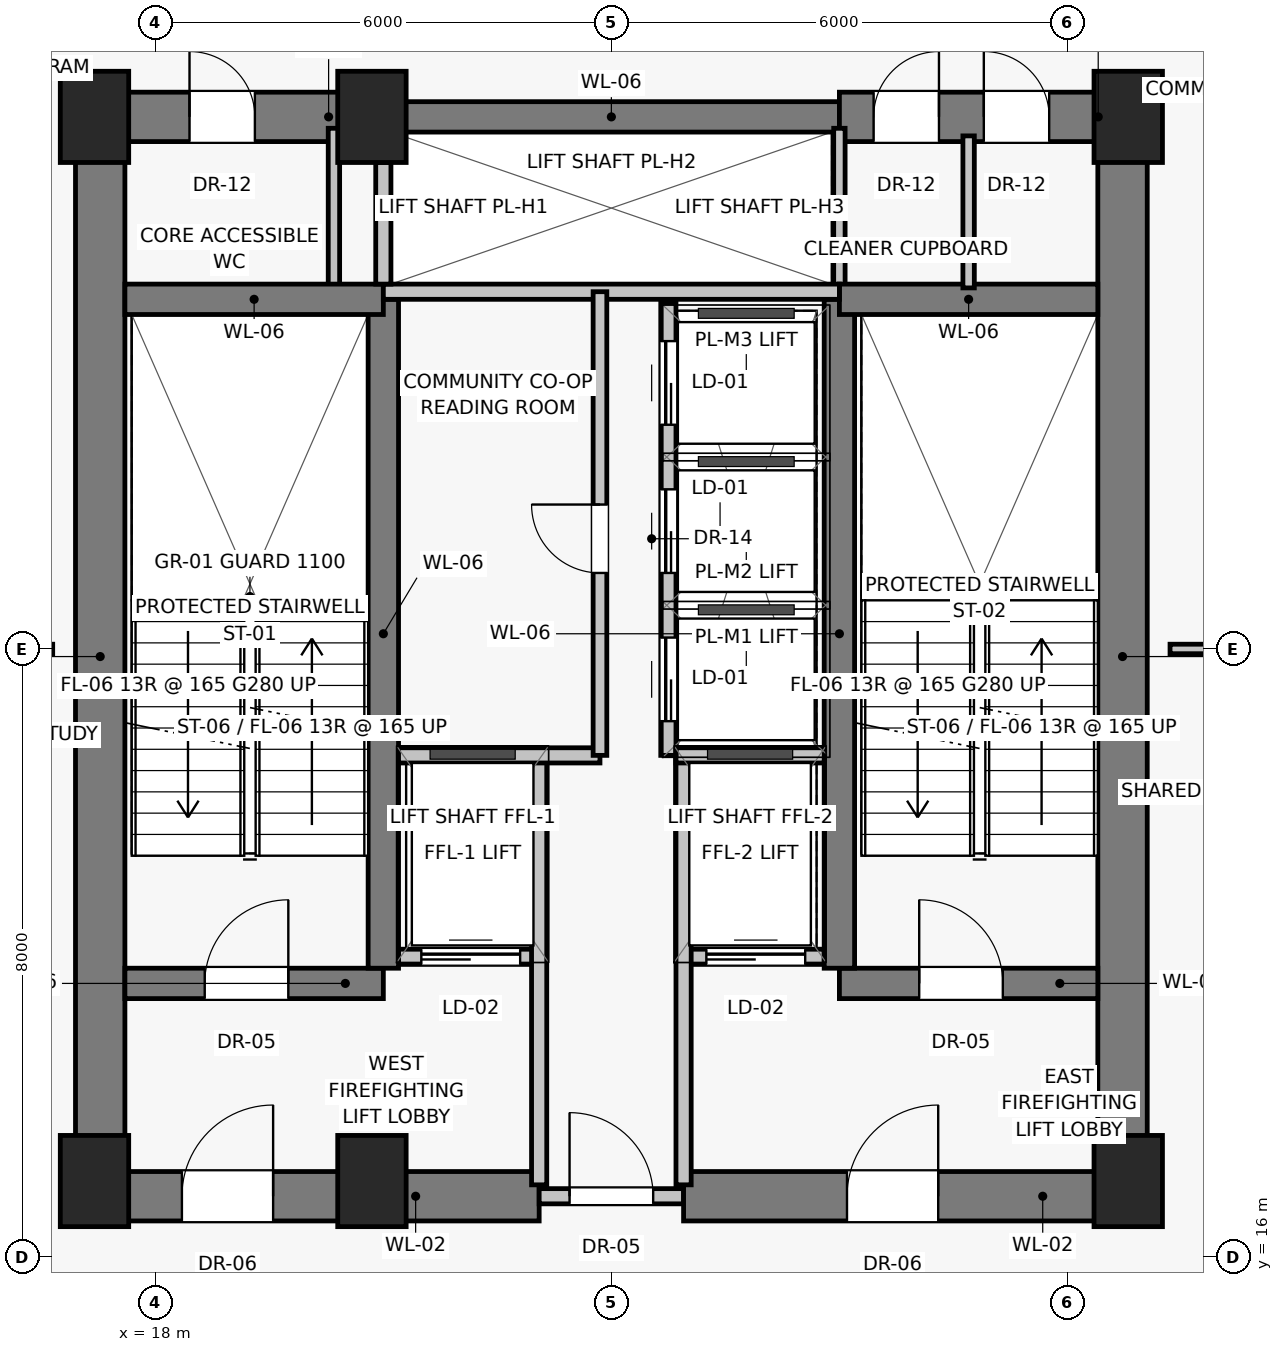
"""IFC4 building model, lengths in metres.
Left out: names, types, materials, properties, quantities, classifications, styles, units other than length and angle.
Written with IfcOpenShell. Run it as: python <this file> out.ifc"""

import sys

from ifc_helpers import new_model, si_unit, direction, frame, frame_2d, origin, origin_2d, place, context, subcontext, project, spatial, rectangle, extrude, source, transform, mapped, element, fill, save


model = new_model("IFC4")
c1 = context("Model", 3, precision=1e-05, world=origin(), true_north=direction((0.0, 1.0)))
c2 = subcontext(c1, "Body", "Model", "MODEL_VIEW")
j1 = project(units=[si_unit("LENGTHUNIT", "METRE"), si_unit("PLANEANGLEUNIT", "RADIAN")], contexts=[c1])
p1 = place(None, origin())
s1 = spatial("IfcSite", under=j1, at=p1, CompositionType="ELEMENT")
p2 = place(p1, origin())
s2 = spatial("IfcBuilding", under=s1, at=p2, CompositionType="ELEMENT")
p3 = place(p2, frame((0.0, 0.0, 108.95)))
s3 = spatial("IfcBuildingStorey", under=s2, at=p3, CompositionType="ELEMENT", Elevation=108.95)
for number, where, z_axis, x_axis in (
    (1, (17.2, 17.0, 0.0), (0.0, 0.0, 1.0), (1.0, 0.0, 0.0)),
    (2, (20.85, 17.0, 0.0), (0.0, 0.0, 1.0), (1.0, 0.0, 0.0)),
    (3, (30.8, 17.0, 0.0), (0.0, 0.0, 1.0), (1.0, 0.0, 0.0)),
    (4, (17.2, 31.0, 0.0), (0.0, 0.0, 1.0), (1.0, 0.0, 0.0)),
    (5, (20.85, 31.0, 0.0), (0.0, 0.0, 1.0), (1.0, 0.0, 0.0)),
    (6, (30.8, 31.0, 0.0), (0.0, 0.0, 1.0), (1.0, 0.0, 0.0)),
):
    element("IfcColumn", number, at=place(p3, frame(where, z_axis=z_axis, x_axis=x_axis)), inside=s3, PredefinedType="PILASTER", context=c2, shape_type="SweptSolid", body=[
        extrude(rectangle(XDim=0.9, YDim=1.2, at=origin_2d()), origin(), (0.0, 0.0, 1.0), 4.3),
    ])
for number, where, z_axis, x_axis in (
    (7, (17.275, 16.8, 0.0), (0.0, 0.0, 1.0), (0.0, 1.0, 0.0)),
    (8, (30.725, 16.8, 0.0), (0.0, 0.0, 1.0), (0.0, 1.0, 0.0)),
):
    element("IfcWall", number, at=place(p3, frame(where, z_axis=z_axis, x_axis=x_axis)), inside=s3, PredefinedType="SHEAR", context=c2, shape_type="SweptSolid", body=[
        extrude(rectangle(XDim=14.2, YDim=0.65, at=frame_2d((7.1, 0.0))), origin(), (0.0, 0.0, 1.0), 4.05),
    ])
p4 = place(p3, frame((17.2, 16.8, 0.0), z_axis=(0.0, 0.0, 1.0), x_axis=(1.0, 0.0, 0.0)))
e9 = element("IfcWall", 9, at=p4, inside=s3, PredefinedType="SHEAR", context=c2, shape_type="SweptSolid", body=[
    extrude(rectangle(XDim=5.85, YDim=0.65, at=frame_2d((2.925, 0.0))), origin(), (0.0, 0.0, 1.0), 4.05),
])
p5 = place(p4, frame((1.15, 0.0, 0.0)))
e10 = element("IfcOpeningElement", 10, at=p5, cuts=e9, PredefinedType="OPENING", context=c2, shape_type="SweptSolid", body=[
    extrude(rectangle(XDim=1.2, YDim=2.03, at=frame_2d((0.6, 1.015))), frame((0.0, 0.335, 0.0), z_axis=(0.0, -1.0, 0.0), x_axis=(1.0, 0.0, 0.0)), (0.0, 0.0, 1.0), 0.67),
])
p6 = place(p3, frame((23.05, 16.8, 0.0), z_axis=(0.0, 0.0, 1.0), x_axis=(1.0, 0.0, 0.0)))
e11 = element("IfcWall", 11, at=p6, inside=s3, PredefinedType="SOLIDWALL", context=c2, shape_type="SweptSolid", body=[
    extrude(rectangle(XDim=1.9, YDim=0.2, at=frame_2d((0.95, 0.0))), origin(), (0.0, 0.0, 1.0), 3.2),
])
p7 = place(p6, frame((0.4, 0.0, 0.0)))
e12 = element("IfcOpeningElement", 12, at=p7, cuts=e11, PredefinedType="OPENING", context=c2, shape_type="SweptSolid", body=[
    extrude(rectangle(XDim=1.1, YDim=2.03, at=frame_2d((0.55, 1.015))), frame((0.0, 0.11, 0.0), z_axis=(0.0, -1.0, 0.0), x_axis=(1.0, 0.0, 0.0)), (0.0, 0.0, 1.0), 0.22),
])
p8 = place(p3, frame((24.95, 16.8, 0.0), z_axis=(0.0, 0.0, 1.0), x_axis=(1.0, 0.0, 0.0)))
e13 = element("IfcWall", 13, at=p8, inside=s3, PredefinedType="SHEAR", context=c2, shape_type="SweptSolid", body=[
    extrude(rectangle(XDim=5.85, YDim=0.65, at=frame_2d((2.925, 0.0))), origin(), (0.0, 0.0, 1.0), 4.05),
])
p9 = place(p8, frame((2.15, 0.0, 0.0)))
e14 = element("IfcOpeningElement", 14, at=p9, cuts=e13, PredefinedType="OPENING", context=c2, shape_type="SweptSolid", body=[
    extrude(rectangle(XDim=1.2, YDim=2.03, at=frame_2d((0.6, 1.015))), frame((0.0, 0.335, 0.0), z_axis=(0.0, -1.0, 0.0), x_axis=(1.0, 0.0, 0.0)), (0.0, 0.0, 1.0), 0.67),
])
p10 = place(p3, frame((17.2, 31.0, 0.0), z_axis=(0.0, 0.0, 1.0), x_axis=(1.0, 0.0, 0.0)))
e15 = element("IfcWall", 15, at=p10, inside=s3, PredefinedType="SHEAR", context=c2, shape_type="SweptSolid", body=[
    extrude(rectangle(XDim=3.8, YDim=0.65, at=frame_2d((1.9, 0.0))), origin(), (0.0, 0.0, 1.0), 4.05),
])
p11 = place(p10, frame((1.25, 0.0, 0.0)))
e16 = element("IfcOpeningElement", 16, at=p11, cuts=e15, PredefinedType="OPENING", context=c2, shape_type="SweptSolid", body=[
    extrude(rectangle(XDim=0.86, YDim=2.01, at=frame_2d((0.43, 1.005))), frame((0.0, 0.335, 0.0), z_axis=(0.0, -1.0, 0.0), x_axis=(1.0, 0.0, 0.0)), (0.0, 0.0, 1.0), 0.67),
])
p12 = place(p3, frame((21.0, 31.0, 0.0), z_axis=(0.0, 0.0, 1.0), x_axis=(1.0, 0.0, 0.0)))
e17 = element("IfcWall", 17, at=p12, inside=s3, PredefinedType="SHEAR", context=c2, shape_type="SweptSolid", body=[
    extrude(rectangle(XDim=6.0, YDim=0.4, at=frame_2d((3.0, 0.0))), origin(), (0.0, 0.0, 1.0), 4.05),
])
p13 = place(p3, frame((27.0, 31.0, 0.0), z_axis=(0.0, 0.0, 1.0), x_axis=(1.0, 0.0, 0.0)))
e18 = element("IfcWall", 18, at=p13, inside=s3, PredefinedType="SHEAR", context=c2, shape_type="SweptSolid", body=[
    extrude(rectangle(XDim=3.8, YDim=0.65, at=frame_2d((1.9, 0.0))), origin(), (0.0, 0.0, 1.0), 4.05),
])
p14 = place(p13, frame((0.45, 0.0, 0.0)))
e19 = element("IfcOpeningElement", 19, at=p14, cuts=e18, PredefinedType="OPENING", context=c2, shape_type="SweptSolid", body=[
    extrude(rectangle(XDim=0.86, YDim=2.01, at=frame_2d((0.43, 1.005))), frame((0.0, 0.335, 0.0), z_axis=(0.0, -1.0, 0.0), x_axis=(1.0, 0.0, 0.0)), (0.0, 0.0, 1.0), 0.67),
])
p15 = place(p13, frame((1.9, 0.0, 0.0)))
e20 = element("IfcOpeningElement", 20, at=p15, cuts=e18, PredefinedType="OPENING", context=c2, shape_type="SweptSolid", body=[
    extrude(rectangle(XDim=0.86, YDim=2.01, at=frame_2d((0.43, 1.005))), frame((0.0, 0.335, 0.0), z_axis=(0.0, -1.0, 0.0), x_axis=(1.0, 0.0, 0.0)), (0.0, 0.0, 1.0), 0.67),
])
for number, where, z_axis, x_axis in (
    (21, (20.35, 28.65, 0.0), (0.0, 0.0, 1.0), (0.0, 1.0, 0.0)),
    (22, (27.0, 28.65, 0.0), (0.0, 0.0, 1.0), (0.0, 1.0, 0.0)),
):
    element("IfcWall", number, at=place(p3, frame(where, z_axis=z_axis, x_axis=x_axis)), inside=s3, PredefinedType="PARTITIONING", context=c2, shape_type="SweptSolid", body=[
        extrude(rectangle(XDim=2.2, YDim=0.15, at=frame_2d((1.1, 0.0))), origin(), (0.0, 0.0, 1.0), 4.05),
    ])
p16 = place(p3, frame((17.6, 19.6, 0.0), z_axis=(0.0, 0.0, 1.0), x_axis=(1.0, 0.0, 0.0)))
e23 = element("IfcWall", 23, at=p16, inside=s3, PredefinedType="SHEAR", context=c2, shape_type="SweptSolid", body=[
    extrude(rectangle(XDim=3.4, YDim=0.4, at=frame_2d((1.7, 0.0))), origin(), (0.0, 0.0, 1.0), 4.05),
])
p17 = place(p16, frame((1.05, 0.0, 0.0)))
e24 = element("IfcOpeningElement", 24, at=p17, cuts=e23, PredefinedType="OPENING", context=c2, shape_type="SweptSolid", body=[
    extrude(rectangle(XDim=1.1, YDim=2.03, at=frame_2d((0.55, 1.015))), frame((0.0, 0.21, 0.0), z_axis=(0.0, -1.0, 0.0), x_axis=(1.0, 0.0, 0.0)), (0.0, 0.0, 1.0), 0.42),
])
p18 = place(p3, frame((21.2, 19.95, 0.0), z_axis=(0.0, 0.0, 1.0), x_axis=(1.0, 0.0, 0.0)))
e25 = element("IfcWall", 25, at=p18, inside=s3, PredefinedType="SOLIDWALL", context=c2, shape_type="SweptSolid", body=[
    extrude(rectangle(XDim=1.85, YDim=0.2, at=frame_2d((0.925, 0.0))), origin(), (0.0, 0.0, 1.0), 4.05),
])
p19 = place(p18, frame((0.3, 0.0, 0.0)))
e26 = element("IfcOpeningElement", 26, at=p19, cuts=e25, PredefinedType="OPENING", context=c2, shape_type="SweptSolid", body=[
    extrude(rectangle(XDim=1.3, YDim=2.25, at=frame_2d((0.65, 1.125))), frame((0.0, 0.11, 0.0), z_axis=(0.0, -1.0, 0.0), x_axis=(1.0, 0.0, 0.0)), (0.0, 0.0, 1.0), 0.22),
])
p20 = place(p3, frame((24.95, 19.95, 0.0), z_axis=(0.0, 0.0, 1.0), x_axis=(1.0, 0.0, 0.0)))
e27 = element("IfcWall", 27, at=p20, inside=s3, PredefinedType="SOLIDWALL", context=c2, shape_type="SweptSolid", body=[
    extrude(rectangle(XDim=1.85, YDim=0.2, at=frame_2d((0.925, 0.0))), origin(), (0.0, 0.0, 1.0), 4.05),
])
p21 = place(p20, frame((0.3, 0.0, 0.0)))
e28 = element("IfcOpeningElement", 28, at=p21, cuts=e27, PredefinedType="OPENING", context=c2, shape_type="SweptSolid", body=[
    extrude(rectangle(XDim=1.3, YDim=2.25, at=frame_2d((0.65, 1.125))), frame((0.0, 0.11, 0.0), z_axis=(0.0, -1.0, 0.0), x_axis=(1.0, 0.0, 0.0)), (0.0, 0.0, 1.0), 0.22),
])
p22 = place(p3, frame((27.0, 19.6, 0.0), z_axis=(0.0, 0.0, 1.0), x_axis=(1.0, 0.0, 0.0)))
e29 = element("IfcWall", 29, at=p22, inside=s3, PredefinedType="SHEAR", context=c2, shape_type="SweptSolid", body=[
    extrude(rectangle(XDim=3.4, YDim=0.4, at=frame_2d((1.7, 0.0))), origin(), (0.0, 0.0, 1.0), 4.05),
])
p23 = place(p22, frame((1.05, 0.0, 0.0)))
e30 = element("IfcOpeningElement", 30, at=p23, cuts=e29, PredefinedType="OPENING", context=c2, shape_type="SweptSolid", body=[
    extrude(rectangle(XDim=1.1, YDim=2.03, at=frame_2d((0.55, 1.015))), frame((0.0, 0.21, 0.0), z_axis=(0.0, -1.0, 0.0), x_axis=(1.0, 0.0, 0.0)), (0.0, 0.0, 1.0), 0.42),
])
for number, where, z_axis, x_axis in (
    (31, (21.0, 19.8, 0.0), (0.0, 0.0, 1.0), (0.0, 1.0, 0.0)),
    (32, (27.0, 19.8, 0.0), (0.0, 0.0, 1.0), (0.0, 1.0, 0.0)),
):
    element("IfcWall", number, at=place(p3, frame(where, z_axis=z_axis, x_axis=x_axis)), inside=s3, PredefinedType="SHEAR", context=c2, shape_type="SweptSolid", body=[
        extrude(rectangle(XDim=8.8, YDim=0.4, at=frame_2d((4.4, 0.0))), origin(), (0.0, 0.0, 1.0), 4.05),
    ])
for number, where, z_axis, x_axis in (
    (33, (17.6, 28.6, 0.0), (0.0, 0.0, 1.0), (1.0, 0.0, 0.0)),
    (34, (27.0, 28.6, 0.0), (0.0, 0.0, 1.0), (1.0, 0.0, 0.0)),
):
    element("IfcWall", number, at=place(p3, frame(where, z_axis=z_axis, x_axis=x_axis)), inside=s3, PredefinedType="SHEAR", context=c2, shape_type="SweptSolid", body=[
        extrude(rectangle(XDim=3.4, YDim=0.4, at=frame_2d((1.7, 0.0))), origin(), (0.0, 0.0, 1.0), 4.05),
    ])
for number, where, z_axis, x_axis in (
    (35, (23.05, 16.95, 0.0), (0.0, 0.0, 1.0), (0.0, 1.0, 0.0)),
    (36, (24.95, 16.95, 0.0), (0.0, 0.0, 1.0), (0.0, 1.0, 0.0)),
):
    element("IfcWall", number, at=place(p3, frame(where, z_axis=z_axis, x_axis=x_axis)), inside=s3, PredefinedType="SOLIDWALL", context=c2, shape_type="SweptSolid", body=[
        extrude(rectangle(XDim=5.6, YDim=0.2, at=frame_2d((2.8, 0.0))), origin(), (0.0, 0.0, 1.0), 4.05),
    ])
p24 = place(p3, frame((21.2, 22.6, 0.0), z_axis=(0.0, 0.0, 1.0), x_axis=(1.0, 0.0, 0.0)))
e37 = element("IfcWall", 37, at=p24, inside=s3, PredefinedType="SOLIDWALL", context=c2, shape_type="SweptSolid", body=[
    extrude(rectangle(XDim=2.65, YDim=0.2, at=frame_2d((1.325, 0.0))), origin(), (0.0, 0.0, 1.0), 4.05),
])
p25 = place(p3, frame((24.85, 22.6, 0.0), z_axis=(0.0, 0.0, 1.0), x_axis=(1.0, 0.0, 0.0)))
e38 = element("IfcWall", 38, at=p25, inside=s3, PredefinedType="SOLIDWALL", context=c2, shape_type="SweptSolid", body=[
    extrude(rectangle(XDim=1.95, YDim=0.2, at=frame_2d((0.975, 0.0))), origin(), (0.0, 0.0, 1.0), 4.05),
])
p26 = place(p3, frame((21.0, 28.7, 0.0), z_axis=(0.0, 0.0, 1.0), x_axis=(1.0, 0.0, 0.0)))
e39 = element("IfcWall", 39, at=p26, inside=s3, PredefinedType="SOLIDWALL", context=c2, shape_type="SweptSolid", body=[
    extrude(rectangle(XDim=6.0, YDim=0.2, at=frame_2d((3.0, 0.0))), origin(), (0.0, 0.0, 1.0), 4.05),
])
p27 = place(p3, frame((21.0, 28.8, 0.0), z_axis=(0.0, 0.0, 1.0), x_axis=(0.0, 1.0, 0.0)))
e40 = element("IfcWall", 40, at=p27, inside=s3, PredefinedType="SOLIDWALL", context=c2, shape_type="SweptSolid", body=[
    extrude(rectangle(XDim=1.6, YDim=0.2, at=frame_2d((0.8, 0.0))), origin(), (0.0, 0.0, 1.0), 4.05),
])
p28 = place(p3, frame((23.85, 22.6, 0.0), z_axis=(0.0, 0.0, 1.0), x_axis=(0.0, 1.0, 0.0)))
e41 = element("IfcWall", 41, at=p28, inside=s3, PredefinedType="PARTITIONING", context=c2, shape_type="SweptSolid", body=[
    extrude(rectangle(XDim=6.1, YDim=0.18, at=frame_2d((3.05, 0.0))), origin(), (0.0, 0.0, 1.0), 4.05),
])
p29 = place(p28, frame((2.4, 0.0, 0.0)))
e42 = element("IfcOpeningElement", 42, at=p29, cuts=e41, PredefinedType="OPENING", context=c2, shape_type="SweptSolid", body=[
    extrude(rectangle(XDim=0.9, YDim=2.01, at=frame_2d((0.45, 1.005))), frame((0.0, 0.1, 0.0), z_axis=(0.0, -1.0, 0.0), x_axis=(1.0, 0.0, 0.0)), (0.0, 0.0, 1.0), 0.2),
])
p30 = place(p3, frame((24.75, 22.6, 0.0), z_axis=(0.0, 0.0, 1.0), x_axis=(0.0, 1.0, 0.0)))
e43 = element("IfcWall", 43, at=p30, inside=s3, PredefinedType="SOLIDWALL", context=c2, shape_type="SweptSolid", body=[
    extrude(rectangle(XDim=5.95, YDim=0.2, at=frame_2d((2.975, 0.0))), origin(), (0.0, 0.0, 1.0), 4.05),
])
p31 = place(p30, frame((0.45, 0.0, 0.0)))
e44 = element("IfcOpeningElement", 44, at=p31, cuts=e43, PredefinedType="OPENING", context=c2, shape_type="SweptSolid", body=[
    extrude(rectangle(XDim=1.1, YDim=2.08, at=frame_2d((0.55, 1.04))), frame((0.0, 0.11, 0.0), z_axis=(0.0, -1.0, 0.0), x_axis=(1.0, 0.0, 0.0)), (0.0, 0.0, 1.0), 0.22),
])
p32 = place(p30, frame((2.4, 0.0, 0.0)))
e45 = element("IfcOpeningElement", 45, at=p32, cuts=e43, PredefinedType="OPENING", context=c2, shape_type="SweptSolid", body=[
    extrude(rectangle(XDim=1.1, YDim=2.08, at=frame_2d((0.55, 1.04))), frame((0.0, 0.11, 0.0), z_axis=(0.0, -1.0, 0.0), x_axis=(1.0, 0.0, 0.0)), (0.0, 0.0, 1.0), 0.22),
])
p33 = place(p30, frame((4.35, 0.0, 0.0)))
e46 = element("IfcOpeningElement", 46, at=p33, cuts=e43, PredefinedType="OPENING", context=c2, shape_type="SweptSolid", body=[
    extrude(rectangle(XDim=1.1, YDim=2.08, at=frame_2d((0.55, 1.04))), frame((0.0, 0.11, 0.0), z_axis=(0.0, -1.0, 0.0), x_axis=(1.0, 0.0, 0.0)), (0.0, 0.0, 1.0), 0.22),
])
p34 = place(p3, frame((28.7, 28.75, 0.0), z_axis=(0.0, 0.0, 1.0), x_axis=(0.0, 1.0, 0.0)))
e47 = element("IfcWall", 47, at=p34, inside=s3, PredefinedType="PARTITIONING", context=c2, shape_type="SweptSolid", body=[
    extrude(rectangle(XDim=2.0, YDim=0.15, at=frame_2d((1.0, 0.0))), origin(), (0.0, 0.0, 1.0), 4.05),
])
p35 = place(p3, frame((31.35, 24.0, 0.0), z_axis=(0.0, 0.0, 1.0), x_axis=(1.0, 0.0, 0.0)))
e48 = element("IfcWall", 48, at=p35, inside=s3, PredefinedType="PARTITIONING", context=c2, shape_type="SweptSolid", body=[
    extrude(rectangle(XDim=2.1, YDim=0.125, at=frame_2d((1.05, 0.0))), origin(), (0.0, 0.0, 1.0), 4.05),
])
m1 = source(origin(), c2, "Body", "SweptSolid", [
    extrude(rectangle(XDim=1.2, YDim=2.03, at=frame_2d((0.6, 1.015))), frame((0.0, 0.025, 0.0), z_axis=(0.0, -1.0, 0.0), x_axis=(1.0, 0.0, 0.0)), (0.0, 0.0, 1.0), 0.05),
])
p36 = place(p5, origin())
e49 = element("IfcDoor", 49, at=p36, inside=s3, OperationType="SINGLE_SWING_RIGHT", PredefinedType="DOOR", context=c2, shape_type="MappedRepresentation", body=[
    mapped(m1, transform((0.0, 0.0, 0.0), scale=1.0)),
])
fill(e10, e49)
m2 = source(origin(), c2, "Body", "SweptSolid", [
    extrude(rectangle(XDim=1.1, YDim=2.03, at=frame_2d((0.55, 1.015))), frame((0.0, 0.025, 0.0), z_axis=(0.0, -1.0, 0.0), x_axis=(1.0, 0.0, 0.0)), (0.0, 0.0, 1.0), 0.05),
])
p37 = place(p7, origin())
e50 = element("IfcDoor", 50, at=p37, inside=s3, OperationType="SINGLE_SWING_LEFT", PredefinedType="DOOR", context=c2, shape_type="MappedRepresentation", body=[
    mapped(m2, transform((0.0, 0.0, 0.0), scale=1.0)),
])
fill(e12, e50)
p38 = place(p9, origin())
e51 = element("IfcDoor", 51, at=p38, inside=s3, OperationType="SINGLE_SWING_RIGHT", PredefinedType="DOOR", context=c2, shape_type="MappedRepresentation", body=[
    mapped(m1, transform((0.0, 0.0, 0.0), scale=1.0)),
])
fill(e14, e51)
m3 = source(origin(), c2, "Body", "SweptSolid", [
    extrude(rectangle(XDim=0.86, YDim=2.01, at=frame_2d((0.43, 1.005))), frame((0.0, 0.025, 0.0), z_axis=(0.0, -1.0, 0.0), x_axis=(1.0, 0.0, 0.0)), (0.0, 0.0, 1.0), 0.05),
])
p39 = place(p11, origin())
e52 = element("IfcDoor", 52, at=p39, inside=s3, OperationType="SINGLE_SWING_LEFT", PredefinedType="DOOR", context=c2, shape_type="MappedRepresentation", body=[
    mapped(m3, transform((0.0, 0.0, 0.0), scale=1.0)),
])
fill(e16, e52)
p40 = place(p14, origin())
e53 = element("IfcDoor", 53, at=p40, inside=s3, OperationType="SINGLE_SWING_RIGHT", PredefinedType="DOOR", context=c2, shape_type="MappedRepresentation", body=[
    mapped(m3, transform((0.0, 0.0, 0.0), scale=1.0)),
])
fill(e19, e53)
p41 = place(p15, origin())
e54 = element("IfcDoor", 54, at=p41, inside=s3, OperationType="SINGLE_SWING_LEFT", PredefinedType="DOOR", context=c2, shape_type="MappedRepresentation", body=[
    mapped(m3, transform((0.0, 0.0, 0.0), scale=1.0)),
])
fill(e20, e54)
p42 = place(p17, origin())
e55 = element("IfcDoor", 55, at=p42, inside=s3, OperationType="SINGLE_SWING_RIGHT", PredefinedType="DOOR", context=c2, shape_type="MappedRepresentation", body=[
    mapped(m2, transform((0.0, 0.0, 0.0), scale=1.0)),
])
fill(e24, e55)
m4 = source(origin(), c2, "Body", "SweptSolid", [
    extrude(rectangle(XDim=1.3, YDim=2.25, at=frame_2d((0.65, 1.125))), frame((0.0, 0.025, 0.0), z_axis=(0.0, -1.0, 0.0), x_axis=(1.0, 0.0, 0.0)), (0.0, 0.0, 1.0), 0.05),
])
p43 = place(p19, origin())
e56 = element("IfcDoor", 56, at=p43, inside=s3, OperationType="SLIDING_TO_LEFT", PredefinedType="DOOR", context=c2, shape_type="MappedRepresentation", body=[
    mapped(m4, transform((0.0, 0.0, 0.0), scale=1.0)),
])
fill(e26, e56)
p44 = place(p21, origin())
e57 = element("IfcDoor", 57, at=p44, inside=s3, OperationType="SLIDING_TO_LEFT", PredefinedType="DOOR", context=c2, shape_type="MappedRepresentation", body=[
    mapped(m4, transform((0.0, 0.0, 0.0), scale=1.0)),
])
fill(e28, e57)
p45 = place(p23, origin())
e58 = element("IfcDoor", 58, at=p45, inside=s3, OperationType="SINGLE_SWING_LEFT", PredefinedType="DOOR", context=c2, shape_type="MappedRepresentation", body=[
    mapped(m2, transform((0.0, 0.0, 0.0), scale=1.0)),
])
fill(e30, e58)
m5 = source(origin(), c2, "Body", "SweptSolid", [
    extrude(rectangle(XDim=0.9, YDim=2.01, at=frame_2d((0.45, 1.005))), frame((0.0, 0.025, 0.0), z_axis=(0.0, -1.0, 0.0), x_axis=(1.0, 0.0, 0.0)), (0.0, 0.0, 1.0), 0.05),
])
p46 = place(p29, origin())
e59 = element("IfcDoor", 59, at=p46, inside=s3, OperationType="SINGLE_SWING_RIGHT", PredefinedType="DOOR", context=c2, shape_type="MappedRepresentation", body=[
    mapped(m5, transform((0.0, 0.0, 0.0), scale=1.0)),
])
fill(e42, e59)
m6 = source(origin(), c2, "Body", "SweptSolid", [
    extrude(rectangle(XDim=1.1, YDim=2.08, at=frame_2d((0.55, 1.04))), frame((0.0, 0.025, 0.0), z_axis=(0.0, -1.0, 0.0), x_axis=(1.0, 0.0, 0.0)), (0.0, 0.0, 1.0), 0.05),
])
p47 = place(p31, origin())
e60 = element("IfcDoor", 60, at=p47, inside=s3, OperationType="SLIDING_TO_LEFT", PredefinedType="DOOR", context=c2, shape_type="MappedRepresentation", body=[
    mapped(m6, transform((0.0, 0.0, 0.0), scale=1.0)),
])
fill(e44, e60)
p48 = place(p32, origin())
e61 = element("IfcDoor", 61, at=p48, inside=s3, OperationType="SLIDING_TO_LEFT", PredefinedType="DOOR", context=c2, shape_type="MappedRepresentation", body=[
    mapped(m6, transform((0.0, 0.0, 0.0), scale=1.0)),
])
fill(e45, e61)
p49 = place(p33, origin())
e62 = element("IfcDoor", 62, at=p49, inside=s3, OperationType="SLIDING_TO_LEFT", PredefinedType="DOOR", context=c2, shape_type="MappedRepresentation", body=[
    mapped(m6, transform((0.0, 0.0, 0.0), scale=1.0)),
])
fill(e46, e62)
save(model, sys.argv[1])
